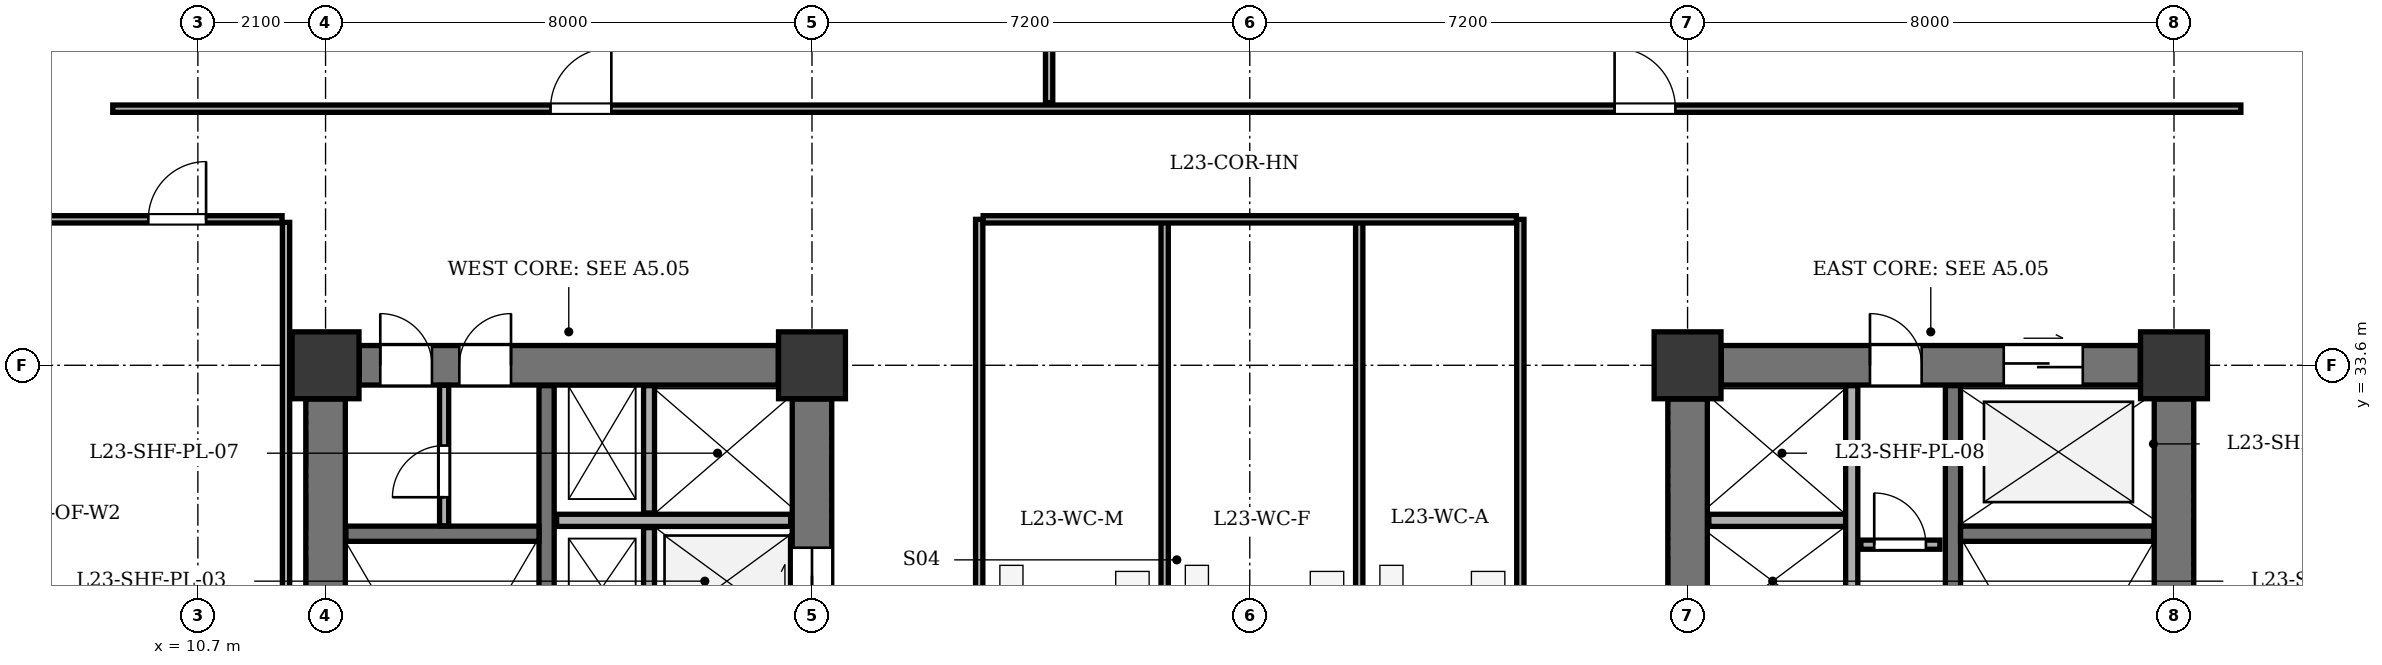
"""IFC4 building model, lengths in metres.
Left out: names, types, materials, properties, quantities, classifications, styles, units other than length and angle.
Written with IfcOpenShell. Run it as: python <this file> out.ifc"""

import sys

from ifc_helpers import new_model, si_unit, direction, frame, frame_2d, origin, origin_2d, place, context, subcontext, project, spatial, rectangle, extrude, element, fill, save


model = new_model("IFC4")
c1 = context("Model", 3, precision=1e-05, world=origin(), true_north=direction((0.0, 1.0)))
c2 = subcontext(c1, "Body", "Model", "MODEL_VIEW")
j1 = project(units=[si_unit("LENGTHUNIT", "METRE"), si_unit("PLANEANGLEUNIT", "RADIAN")], contexts=[c1])
p1 = place(None, origin())
s1 = spatial("IfcSite", under=j1, at=p1, CompositionType="ELEMENT")
p2 = place(p1, origin())
s2 = spatial("IfcBuilding", under=s1, at=p2, CompositionType="ELEMENT")
p3 = place(p2, frame((0.0, 0.0, 94.5)))
s3 = spatial("IfcBuildingStorey", under=s2, at=p3, CompositionType="ELEMENT", Elevation=94.5)
for number, where, z_axis, x_axis in (
    (1, (12.8, 33.6, 0.0), (0.0, 0.0, 1.0), (1.0, 0.0, 0.0)),
    (2, (20.8, 33.6, 0.0), (0.0, 0.0, 1.0), (1.0, 0.0, 0.0)),
    (3, (35.2, 33.6, 0.0), (0.0, 0.0, 1.0), (1.0, 0.0, 0.0)),
    (4, (43.2, 33.6, 0.0), (0.0, 0.0, 1.0), (1.0, 0.0, 0.0)),
):
    element("IfcColumn", number, at=place(p3, frame(where, z_axis=z_axis, x_axis=x_axis)), inside=s3, PredefinedType="COLUMN", context=c2, shape_type="SweptSolid", body=[
        extrude(rectangle(XDim=1.1, YDim=1.1, at=origin_2d()), origin(), (0.0, 0.0, 1.0), 3.9),
    ])
p4 = place(p3, frame((12.8, 21.355, 0.0), z_axis=(0.0, 0.0, 1.0), x_axis=(0.0, 1.0, 0.0)))
e5 = element("IfcWall", 5, at=p4, inside=s3, PredefinedType="SHEAR", context=c2, shape_type="SweptSolid", body=[
    extrude(rectangle(XDim=11.69, YDim=0.65, at=frame_2d((5.845, 0.0))), origin(), (0.0, 0.0, 1.0), 3.6),
])
p5 = place(p3, frame((13.355, 33.6, 0.0), z_axis=(0.0, 0.0, 1.0), x_axis=(1.0, 0.0, 0.0)))
e6 = element("IfcWall", 6, at=p5, inside=s3, PredefinedType="SHEAR", context=c2, shape_type="SweptSolid", body=[
    extrude(rectangle(XDim=6.89, YDim=0.65, at=frame_2d((3.445, 0.0))), origin(), (0.0, 0.0, 1.0), 3.6),
])
p6 = place(p5, frame((0.345, 0.0, 0.0)))
e7 = element("IfcOpeningElement", 7, at=p6, cuts=e6, PredefinedType="OPENING", context=c2, shape_type="SweptSolid", body=[
    extrude(rectangle(XDim=0.85, YDim=2.02, at=frame_2d((0.425, 1.01))), frame((0.0, 0.335, 0.0), z_axis=(0.0, -1.0, 0.0), x_axis=(1.0, 0.0, 0.0)), (0.0, 0.0, 1.0), 0.67),
])
p7 = place(p5, frame((1.645, 0.0, 0.0)))
e8 = element("IfcOpeningElement", 8, at=p7, cuts=e6, PredefinedType="OPENING", context=c2, shape_type="SweptSolid", body=[
    extrude(rectangle(XDim=0.85, YDim=2.02, at=frame_2d((0.425, 1.01))), frame((0.0, 0.335, 0.0), z_axis=(0.0, -1.0, 0.0), x_axis=(1.0, 0.0, 0.0)), (0.0, 0.0, 1.0), 0.67),
])
p8 = place(p3, frame((20.8, 21.355, 0.0), z_axis=(0.0, 0.0, 1.0), x_axis=(0.0, 1.0, 0.0)))
e9 = element("IfcWall", 9, at=p8, inside=s3, PredefinedType="SHEAR", context=c2, shape_type="SweptSolid", body=[
    extrude(rectangle(XDim=11.69, YDim=0.65, at=frame_2d((5.845, 0.0))), origin(), (0.0, 0.0, 1.0), 3.6),
])
p9 = place(p8, frame((1.245, 0.0, 0.0)))
e10 = element("IfcOpeningElement", 10, at=p9, cuts=e9, PredefinedType="OPENING", context=c2, shape_type="SweptSolid", body=[
    extrude(rectangle(XDim=1.2, YDim=2.15, at=frame_2d((0.6, 1.075))), frame((0.0, 0.335, 0.0), z_axis=(0.0, -1.0, 0.0), x_axis=(1.0, 0.0, 0.0)), (0.0, 0.0, 1.0), 0.67),
])
p10 = place(p8, frame((4.245, 0.0, 0.0)))
e11 = element("IfcOpeningElement", 11, at=p10, cuts=e9, PredefinedType="OPENING", context=c2, shape_type="SweptSolid", body=[
    extrude(rectangle(XDim=1.1, YDim=2.1, at=frame_2d((0.55, 1.05))), frame((0.0, 0.335, 0.0), z_axis=(0.0, -1.0, 0.0), x_axis=(1.0, 0.0, 0.0)), (0.0, 0.0, 1.0), 0.67),
])
p11 = place(p8, frame((6.195, 0.0, 0.0)))
e12 = element("IfcOpeningElement", 12, at=p11, cuts=e9, PredefinedType="OPENING", context=c2, shape_type="SweptSolid", body=[
    extrude(rectangle(XDim=1.1, YDim=2.1, at=frame_2d((0.55, 1.05))), frame((0.0, 0.335, 0.0), z_axis=(0.0, -1.0, 0.0), x_axis=(1.0, 0.0, 0.0)), (0.0, 0.0, 1.0), 0.67),
])
p12 = place(p8, frame((8.145, 0.0, 0.0)))
e13 = element("IfcOpeningElement", 13, at=p12, cuts=e9, PredefinedType="OPENING", context=c2, shape_type="SweptSolid", body=[
    extrude(rectangle(XDim=1.1, YDim=2.1, at=frame_2d((0.55, 1.05))), frame((0.0, 0.335, 0.0), z_axis=(0.0, -1.0, 0.0), x_axis=(1.0, 0.0, 0.0)), (0.0, 0.0, 1.0), 0.67),
])
p13 = place(p3, frame((16.435, 21.135, 0.0), z_axis=(0.0, 0.0, 1.0), x_axis=(0.0, 1.0, 0.0)))
e14 = element("IfcWall", 14, at=p13, inside=s3, PredefinedType="SHEAR", context=c2, shape_type="SweptSolid", body=[
    extrude(rectangle(XDim=12.13, YDim=0.25, at=frame_2d((6.065, 0.0))), origin(), (0.0, 0.0, 1.0), 3.6),
])
p14 = place(p13, frame((0.515, 0.0, 0.0)))
e15 = element("IfcOpeningElement", 15, at=p14, cuts=e14, PredefinedType="OPENING", context=c2, shape_type="SweptSolid", body=[
    extrude(rectangle(XDim=1.2, YDim=2.15, at=frame_2d((0.6, 1.075))), frame((0.0, 0.135, 0.0), z_axis=(0.0, -1.0, 0.0), x_axis=(1.0, 0.0, 0.0)), (0.0, 0.0, 1.0), 0.27),
])
p15 = place(p13, frame((2.665, 0.0, 0.0)))
e16 = element("IfcOpeningElement", 16, at=p15, cuts=e14, PredefinedType="OPENING", context=c2, shape_type="SweptSolid", body=[
    extrude(rectangle(XDim=1.15, YDim=2.15, at=frame_2d((0.575, 1.075))), frame((0.0, 0.135, 0.0), z_axis=(0.0, -1.0, 0.0), x_axis=(1.0, 0.0, 0.0)), (0.0, 0.0, 1.0), 0.27),
])
p16 = place(p3, frame((13.135, 30.83, 0.0), z_axis=(0.0, 0.0, 1.0), x_axis=(1.0, 0.0, 0.0)))
e17 = element("IfcWall", 17, at=p16, inside=s3, PredefinedType="SHEAR", context=c2, shape_type="SweptSolid", body=[
    extrude(rectangle(XDim=3.175, YDim=0.25, at=frame_2d((1.587, 0.0))), origin(), (0.0, 0.0, 1.0), 3.6),
])
p17 = place(p3, frame((16.6, 31.05, 0.0), z_axis=(0.0, 0.0, 1.0), x_axis=(1.0, 0.0, 0.0)))
e18 = element("IfcWall", 18, at=p17, inside=s3, PredefinedType="SOLIDWALL", context=c2, shape_type="SweptSolid", body=[
    extrude(rectangle(XDim=3.85, YDim=0.2, at=frame_2d((1.925, 0.0))), origin(), (0.0, 0.0, 1.0), 3.6),
])
p18 = place(p3, frame((18.12, 25.27, 0.0), z_axis=(0.0, 0.0, 1.0), x_axis=(0.0, 1.0, 0.0)))
e19 = element("IfcWall", 19, at=p18, inside=s3, PredefinedType="PARTITIONING", context=c2, shape_type="SweptSolid", body=[
    extrude(rectangle(XDim=5.66, YDim=0.18, at=frame_2d((2.83, 0.0))), origin(), (0.0, 0.0, 1.0), 3.6),
])
p19 = place(p3, frame((18.12, 31.17, 0.0), z_axis=(0.0, 0.0, 1.0), x_axis=(0.0, 1.0, 0.0)))
e20 = element("IfcWall", 20, at=p19, inside=s3, PredefinedType="PARTITIONING", context=c2, shape_type="SweptSolid", body=[
    extrude(rectangle(XDim=2.095, YDim=0.18, at=frame_2d((1.047, 0.0))), origin(), (0.0, 0.0, 1.0), 3.6),
])
p20 = place(p3, frame((43.2, 21.355, 0.0), z_axis=(0.0, 0.0, 1.0), x_axis=(0.0, 1.0, 0.0)))
e21 = element("IfcWall", 21, at=p20, inside=s3, PredefinedType="SHEAR", context=c2, shape_type="SweptSolid", body=[
    extrude(rectangle(XDim=11.69, YDim=0.65, at=frame_2d((5.845, 0.0))), origin(), (0.0, 0.0, 1.0), 3.6),
])
p21 = place(p3, frame((35.755, 33.6, 0.0), z_axis=(0.0, 0.0, 1.0), x_axis=(1.0, 0.0, 0.0)))
e22 = element("IfcWall", 22, at=p21, inside=s3, PredefinedType="SHEAR", context=c2, shape_type="SweptSolid", body=[
    extrude(rectangle(XDim=6.89, YDim=0.65, at=frame_2d((3.445, 0.0))), origin(), (0.0, 0.0, 1.0), 3.6),
])
p22 = place(p21, frame((4.645, 0.0, 0.0)))
e23 = element("IfcOpeningElement", 23, at=p22, cuts=e22, PredefinedType="OPENING", context=c2, shape_type="SweptSolid", body=[
    extrude(rectangle(XDim=1.3, YDim=2.15, at=frame_2d((0.65, 1.075))), frame((0.0, 0.335, 0.0), z_axis=(0.0, -1.0, 0.0), x_axis=(1.0, 0.0, 0.0)), (0.0, 0.0, 1.0), 0.67),
])
p23 = place(p21, frame((2.445, 0.0, 0.0)))
e24 = element("IfcOpeningElement", 24, at=p23, cuts=e22, PredefinedType="OPENING", context=c2, shape_type="SweptSolid", body=[
    extrude(rectangle(XDim=0.85, YDim=2.02, at=frame_2d((0.425, 1.01))), frame((0.0, 0.335, 0.0), z_axis=(0.0, -1.0, 0.0), x_axis=(1.0, 0.0, 0.0)), (0.0, 0.0, 1.0), 0.67),
])
p24 = place(p3, frame((35.2, 21.355, 0.0), z_axis=(0.0, 0.0, 1.0), x_axis=(0.0, 1.0, 0.0)))
e25 = element("IfcWall", 25, at=p24, inside=s3, PredefinedType="SHEAR", context=c2, shape_type="SweptSolid", body=[
    extrude(rectangle(XDim=11.69, YDim=0.65, at=frame_2d((5.845, 0.0))), origin(), (0.0, 0.0, 1.0), 3.6),
])
p25 = place(p24, frame((1.245, 0.0, 0.0)))
e26 = element("IfcOpeningElement", 26, at=p25, cuts=e25, PredefinedType="OPENING", context=c2, shape_type="SweptSolid", body=[
    extrude(rectangle(XDim=1.2, YDim=2.15, at=frame_2d((0.6, 1.075))), frame((0.0, 0.335, 0.0), z_axis=(0.0, -1.0, 0.0), x_axis=(1.0, 0.0, 0.0)), (0.0, 0.0, 1.0), 0.67),
])
p26 = place(p3, frame((39.565, 21.135, 0.0), z_axis=(0.0, 0.0, 1.0), x_axis=(0.0, 1.0, 0.0)))
e27 = element("IfcWall", 27, at=p26, inside=s3, PredefinedType="SHEAR", context=c2, shape_type="SweptSolid", body=[
    extrude(rectangle(XDim=12.13, YDim=0.25, at=frame_2d((6.065, 0.0))), origin(), (0.0, 0.0, 1.0), 3.6),
])
p27 = place(p26, frame((0.515, 0.0, 0.0)))
e28 = element("IfcOpeningElement", 28, at=p27, cuts=e27, PredefinedType="OPENING", context=c2, shape_type="SweptSolid", body=[
    extrude(rectangle(XDim=1.2, YDim=2.15, at=frame_2d((0.6, 1.075))), frame((0.0, 0.135, 0.0), z_axis=(0.0, -1.0, 0.0), x_axis=(1.0, 0.0, 0.0)), (0.0, 0.0, 1.0), 0.27),
])
p28 = place(p26, frame((2.665, 0.0, 0.0)))
e29 = element("IfcOpeningElement", 29, at=p28, cuts=e27, PredefinedType="OPENING", context=c2, shape_type="SweptSolid", body=[
    extrude(rectangle(XDim=1.15, YDim=2.15, at=frame_2d((0.575, 1.075))), frame((0.0, 0.135, 0.0), z_axis=(0.0, -1.0, 0.0), x_axis=(1.0, 0.0, 0.0)), (0.0, 0.0, 1.0), 0.27),
])
p29 = place(p3, frame((39.69, 30.83, 0.0), z_axis=(0.0, 0.0, 1.0), x_axis=(1.0, 0.0, 0.0)))
e30 = element("IfcWall", 30, at=p29, inside=s3, PredefinedType="SHEAR", context=c2, shape_type="SweptSolid", body=[
    extrude(rectangle(XDim=3.175, YDim=0.25, at=frame_2d((1.587, 0.0))), origin(), (0.0, 0.0, 1.0), 3.6),
])
p30 = place(p3, frame((35.55, 31.05, 0.0), z_axis=(0.0, 0.0, 1.0), x_axis=(1.0, 0.0, 0.0)))
e31 = element("IfcWall", 31, at=p30, inside=s3, PredefinedType="SOLIDWALL", context=c2, shape_type="SweptSolid", body=[
    extrude(rectangle(XDim=2.25, YDim=0.2, at=frame_2d((1.125, 0.0))), origin(), (0.0, 0.0, 1.0), 3.6),
])
p31 = place(p3, frame((37.9, 25.27, 0.0), z_axis=(0.0, 0.0, 1.0), x_axis=(0.0, 1.0, 0.0)))
e32 = element("IfcWall", 32, at=p31, inside=s3, PredefinedType="SOLIDWALL", context=c2, shape_type="SweptSolid", body=[
    extrude(rectangle(XDim=7.995, YDim=0.2, at=frame_2d((3.998, 0.0))), origin(), (0.0, 0.0, 1.0), 3.6),
])
p32 = place(p3, frame((14.75, 30.96, 0.0), z_axis=(0.0, 0.0, 1.0), x_axis=(0.0, 1.0, 0.0)))
e33 = element("IfcWall", 33, at=p32, inside=s3, PredefinedType="PARTITIONING", context=c2, shape_type="SweptSolid", body=[
    extrude(rectangle(XDim=2.31, YDim=0.15, at=frame_2d((1.155, 0.0))), origin(), (0.0, 0.0, 1.0), 3.6),
])
p33 = place(p32, frame((0.47, 0.0, 0.0)))
e34 = element("IfcOpeningElement", 34, at=p33, cuts=e33, PredefinedType="OPENING", context=c2, shape_type="SweptSolid", body=[
    extrude(rectangle(XDim=0.85, YDim=2.02, at=frame_2d((0.425, 1.01))), frame((0.0, 0.085, 0.0), z_axis=(0.0, -1.0, 0.0), x_axis=(1.0, 0.0, 0.0)), (0.0, 0.0, 1.0), 0.17),
])
p34 = place(p3, frame((38.05, 30.65, 0.0), z_axis=(0.0, 0.0, 1.0), x_axis=(1.0, 0.0, 0.0)))
e35 = element("IfcWall", 35, at=p34, inside=s3, PredefinedType="PARTITIONING", context=c2, shape_type="SweptSolid", body=[
    extrude(rectangle(XDim=1.3, YDim=0.15, at=frame_2d((0.65, 0.0))), origin(), (0.0, 0.0, 1.0), 3.6),
])
p35 = place(p34, frame((0.22, 0.0, 0.0)))
e36 = element("IfcOpeningElement", 36, at=p35, cuts=e35, PredefinedType="OPENING", context=c2, shape_type="SweptSolid", body=[
    extrude(rectangle(XDim=0.85, YDim=2.02, at=frame_2d((0.425, 1.01))), frame((0.0, 0.085, 0.0), z_axis=(0.0, -1.0, 0.0), x_axis=(1.0, 0.0, 0.0)), (0.0, 0.0, 1.0), 0.17),
])
for number, where, z_axis, x_axis in (
    (37, (23.55, 24.715, 0.0), (0.0, 0.0, 1.0), (0.0, 1.0, 0.0)),
    (38, (32.45, 24.715, 0.0), (0.0, 0.0, 1.0), (0.0, 1.0, 0.0)),
    (39, (26.6, 24.715, 0.0), (0.0, 0.0, 1.0), (0.0, 1.0, 0.0)),
):
    element("IfcWall", number, at=place(p3, frame(where, z_axis=z_axis, x_axis=x_axis)), inside=s3, PredefinedType="PARTITIONING", context=c2, shape_type="SweptSolid", body=[
        extrude(rectangle(XDim=11.285, YDim=0.12, at=frame_2d((5.643, 0.0))), origin(), (0.0, 0.0, 1.0), 3.6),
    ])
p36 = place(p3, frame((29.8, 24.715, 0.0), z_axis=(0.0, 0.0, 1.0), x_axis=(0.0, 1.0, 0.0)))
e40 = element("IfcWall", 40, at=p36, inside=s3, PredefinedType="PARTITIONING", context=c2, shape_type="SweptSolid", body=[
    extrude(rectangle(XDim=11.285, YDim=0.12, at=frame_2d((5.643, 0.0))), origin(), (0.0, 0.0, 1.0), 3.135),
])
p37 = place(p3, frame((23.615, 36.0, 0.0), z_axis=(0.0, 0.0, 1.0), x_axis=(1.0, 0.0, 0.0)))
e41 = element("IfcWall", 41, at=p37, inside=s3, PredefinedType="PARTITIONING", context=c2, shape_type="SweptSolid", body=[
    extrude(rectangle(XDim=8.77, YDim=0.12, at=frame_2d((4.385, 0.0))), origin(), (0.0, 0.0, 1.0), 3.6),
])
p38 = place(p3, frame((9.3, 37.82, 0.0), z_axis=(0.0, 0.0, 1.0), x_axis=(1.0, 0.0, 0.0)))
e42 = element("IfcWall", 42, at=p38, inside=s3, PredefinedType="PARTITIONING", context=c2, shape_type="SweptSolid", body=[
    extrude(rectangle(XDim=35.0, YDim=0.12, at=frame_2d((17.5, 0.0))), origin(), (0.0, 0.0, 1.0), 3.6),
])
p39 = place(p38, frame((7.2, 0.0, 0.0)))
e43 = element("IfcOpeningElement", 43, at=p39, cuts=e42, PredefinedType="OPENING", context=c2, shape_type="SweptSolid", body=[
    extrude(rectangle(XDim=1.0, YDim=2.1, at=frame_2d((0.5, 1.05))), frame((0.0, 0.07, 0.0), z_axis=(0.0, -1.0, 0.0), x_axis=(1.0, 0.0, 0.0)), (0.0, 0.0, 1.0), 0.14),
])
p40 = place(p38, frame((24.7, 0.0, 0.0)))
e44 = element("IfcOpeningElement", 44, at=p40, cuts=e42, PredefinedType="OPENING", context=c2, shape_type="SweptSolid", body=[
    extrude(rectangle(XDim=1.0, YDim=2.1, at=frame_2d((0.5, 1.05))), frame((0.0, 0.07, 0.0), z_axis=(0.0, -1.0, 0.0), x_axis=(1.0, 0.0, 0.0)), (0.0, 0.0, 1.0), 0.14),
])
p41 = place(p3, frame((24.7, 37.92, 0.0), z_axis=(0.0, 0.0, 1.0), x_axis=(0.0, 1.0, 0.0)))
e45 = element("IfcWall", 45, at=p41, inside=s3, PredefinedType="PARTITIONING", context=c2, shape_type="SweptSolid", body=[
    extrude(rectangle(XDim=14.575, YDim=0.12, at=frame_2d((7.288, 0.0))), origin(), (0.0, 0.0, 1.0), 3.6),
])
p42 = place(p3, frame((12.15, 18.45, 0.0), z_axis=(0.0, 0.0, 1.0), x_axis=(0.0, 1.0, 0.0)))
e46 = element("IfcWall", 46, at=p42, inside=s3, PredefinedType="PARTITIONING", context=c2, shape_type="SweptSolid", body=[
    extrude(rectangle(XDim=17.5, YDim=0.12, at=frame_2d((8.75, 0.0))), origin(), (0.0, 0.0, 1.0), 3.6),
])
p43 = place(p3, frame((4.705, 36.0, 0.0), z_axis=(0.0, 0.0, 1.0), x_axis=(1.0, 0.0, 0.0)))
e47 = element("IfcWall", 47, at=p43, inside=s3, PredefinedType="PARTITIONING", context=c2, shape_type="SweptSolid", body=[
    extrude(rectangle(XDim=7.38, YDim=0.12, at=frame_2d((3.69, 0.0))), origin(), (0.0, 0.0, 1.0), 3.6),
])
p44 = place(p43, frame((5.18, 0.0, 0.0)))
e48 = element("IfcOpeningElement", 48, at=p44, cuts=e47, PredefinedType="OPENING", context=c2, shape_type="SweptSolid", body=[
    extrude(rectangle(XDim=0.95, YDim=2.1, at=frame_2d((0.475, 1.05))), frame((0.0, 0.07, 0.0), z_axis=(0.0, -1.0, 0.0), x_axis=(1.0, 0.0, 0.0)), (0.0, 0.0, 1.0), 0.14),
])
p45 = place(p6, origin())
e49 = element("IfcDoor", 49, at=p45, inside=s3, OperationType="SINGLE_SWING_LEFT", PredefinedType="DOOR", context=c2, shape_type="SweptSolid", body=[
    extrude(rectangle(XDim=0.85, YDim=2.02, at=frame_2d((0.425, 1.01))), frame((0.0, 0.025, 0.0), z_axis=(0.0, -1.0, 0.0), x_axis=(1.0, 0.0, 0.0)), (0.0, 0.0, 1.0), 0.05),
])
fill(e7, e49)
p46 = place(p7, origin())
e50 = element("IfcDoor", 50, at=p46, inside=s3, OperationType="SINGLE_SWING_RIGHT", PredefinedType="DOOR", context=c2, shape_type="SweptSolid", body=[
    extrude(rectangle(XDim=0.85, YDim=2.02, at=frame_2d((0.425, 1.01))), frame((0.0, 0.025, 0.0), z_axis=(0.0, -1.0, 0.0), x_axis=(1.0, 0.0, 0.0)), (0.0, 0.0, 1.0), 0.05),
])
fill(e8, e50)
p47 = place(p12, origin())
e51 = element("IfcDoor", 51, at=p47, inside=s3, OperationType="DOUBLE_DOOR_SLIDING", PredefinedType="DOOR", context=c2, shape_type="SweptSolid", body=[
    extrude(rectangle(XDim=1.1, YDim=2.1, at=frame_2d((0.55, 1.05))), frame((0.0, 0.025, 0.0), z_axis=(0.0, -1.0, 0.0), x_axis=(1.0, 0.0, 0.0)), (0.0, 0.0, 1.0), 0.05),
])
fill(e13, e51)
p48 = place(p22, origin())
e52 = element("IfcDoor", 52, at=p48, inside=s3, OperationType="DOUBLE_DOOR_SLIDING", PredefinedType="DOOR", context=c2, shape_type="SweptSolid", body=[
    extrude(rectangle(XDim=1.3, YDim=2.15, at=frame_2d((0.65, 1.075))), frame((0.0, 0.025, 0.0), z_axis=(0.0, -1.0, 0.0), x_axis=(1.0, 0.0, 0.0)), (0.0, 0.0, 1.0), 0.05),
])
fill(e23, e52)
p49 = place(p23, origin())
e53 = element("IfcDoor", 53, at=p49, inside=s3, OperationType="SINGLE_SWING_LEFT", PredefinedType="DOOR", context=c2, shape_type="SweptSolid", body=[
    extrude(rectangle(XDim=0.85, YDim=2.02, at=frame_2d((0.425, 1.01))), frame((0.0, 0.025, 0.0), z_axis=(0.0, -1.0, 0.0), x_axis=(1.0, 0.0, 0.0)), (0.0, 0.0, 1.0), 0.05),
])
fill(e24, e53)
p50 = place(p33, origin())
e54 = element("IfcDoor", 54, at=p50, inside=s3, OperationType="SINGLE_SWING_LEFT", PredefinedType="DOOR", context=c2, shape_type="SweptSolid", body=[
    extrude(rectangle(XDim=0.85, YDim=2.02, at=frame_2d((0.425, 1.01))), frame((0.0, 0.025, 0.0), z_axis=(0.0, -1.0, 0.0), x_axis=(1.0, 0.0, 0.0)), (0.0, 0.0, 1.0), 0.05),
])
fill(e34, e54)
p51 = place(p35, origin())
e55 = element("IfcDoor", 55, at=p51, inside=s3, OperationType="SINGLE_SWING_LEFT", PredefinedType="DOOR", context=c2, shape_type="SweptSolid", body=[
    extrude(rectangle(XDim=0.85, YDim=2.02, at=frame_2d((0.425, 1.01))), frame((0.0, 0.025, 0.0), z_axis=(0.0, -1.0, 0.0), x_axis=(1.0, 0.0, 0.0)), (0.0, 0.0, 1.0), 0.05),
])
fill(e36, e55)
p52 = place(p39, origin())
e56 = element("IfcDoor", 56, at=p52, inside=s3, OperationType="SINGLE_SWING_RIGHT", PredefinedType="DOOR", context=c2, shape_type="SweptSolid", body=[
    extrude(rectangle(XDim=1.0, YDim=2.1, at=frame_2d((0.5, 1.05))), frame((0.0, 0.025, 0.0), z_axis=(0.0, -1.0, 0.0), x_axis=(1.0, 0.0, 0.0)), (0.0, 0.0, 1.0), 0.05),
])
fill(e43, e56)
p53 = place(p40, origin())
e57 = element("IfcDoor", 57, at=p53, inside=s3, OperationType="SINGLE_SWING_LEFT", PredefinedType="DOOR", context=c2, shape_type="SweptSolid", body=[
    extrude(rectangle(XDim=1.0, YDim=2.1, at=frame_2d((0.5, 1.05))), frame((0.0, 0.025, 0.0), z_axis=(0.0, -1.0, 0.0), x_axis=(1.0, 0.0, 0.0)), (0.0, 0.0, 1.0), 0.05),
])
fill(e44, e57)
p54 = place(p44, origin())
e58 = element("IfcDoor", 58, at=p54, inside=s3, OperationType="SINGLE_SWING_RIGHT", PredefinedType="DOOR", context=c2, shape_type="SweptSolid", body=[
    extrude(rectangle(XDim=0.95, YDim=2.1, at=frame_2d((0.475, 1.05))), frame((0.0, 0.025, 0.0), z_axis=(0.0, -1.0, 0.0), x_axis=(1.0, 0.0, 0.0)), (0.0, 0.0, 1.0), 0.05),
])
fill(e48, e58)
save(model, sys.argv[1])
